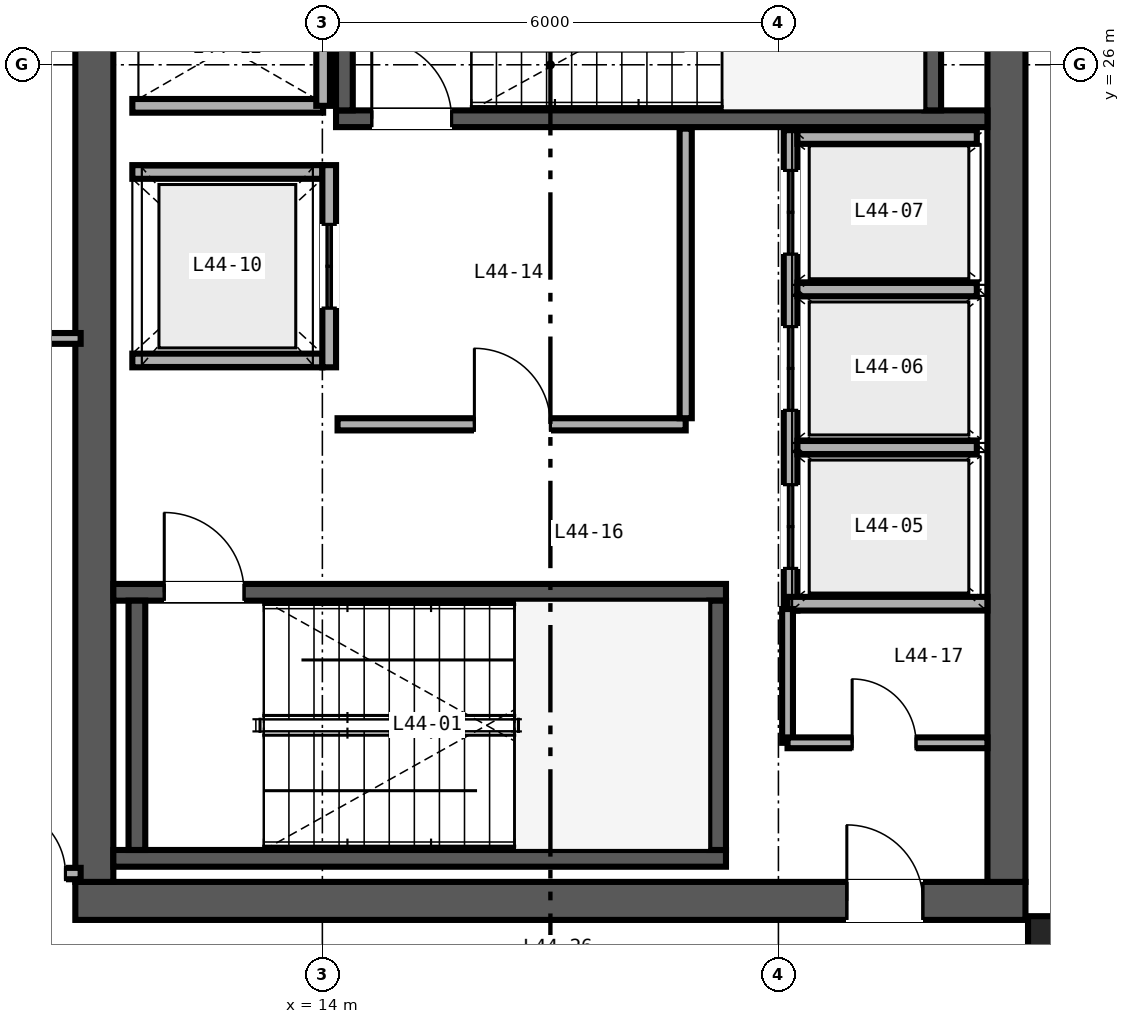
"""IFC4 building model, lengths in metres.
Left out: names, types, materials, properties, quantities, classifications, styles, units other than length and angle.
Written with IfcOpenShell. Run it as: python <this file> out.ifc"""

import sys

from ifc_helpers import new_model, si_unit, direction, frame, frame_2d, origin, origin_2d, place, context, subcontext, project, spatial, rectangle, i_section, extrude, source, transform, mapped, element, fill, save


model = new_model("IFC4")
c1 = context("Model", 3, precision=1e-05, world=origin(), true_north=direction((0.0, 1.0)))
c2 = subcontext(c1, "Body", "Model", "MODEL_VIEW")
j1 = project(units=[si_unit("LENGTHUNIT", "METRE"), si_unit("PLANEANGLEUNIT", "RADIAN")], contexts=[c1])
p1 = place(None, origin())
s1 = spatial("IfcSite", under=j1, at=p1, CompositionType="ELEMENT")
p2 = place(p1, origin())
s2 = spatial("IfcBuilding", under=s1, at=p2, CompositionType="ELEMENT")
p3 = place(p2, frame((0.0, 0.0, 177.6)))
s3 = spatial("IfcBuildingStorey", under=s2, at=p3, CompositionType="ELEMENT", Elevation=177.6)
p4 = place(p3, frame((10.75, 15.0, 0.0), z_axis=(0.0, 0.0, 1.0), x_axis=(1.0, 0.0, 0.0)))
e1 = element("IfcWall", 1, at=p4, inside=s3, PredefinedType="SHEAR", context=c2, shape_type="SweptSolid", body=[
    extrude(rectangle(XDim=12.5, YDim=0.5, at=frame_2d((6.25, 0.0))), origin(), (0.0, 0.0, 1.0), 3.37),
])
p5 = place(p4, frame((10.15, 0.0, 0.0)))
e2 = element("IfcOpeningElement", 2, at=p5, cuts=e1, PredefinedType="OPENING", context=c2, shape_type="SweptSolid", body=[
    extrude(rectangle(XDim=1.0, YDim=2.15, at=frame_2d((0.5, 1.075))), frame((0.0, 0.26, 0.0), z_axis=(0.0, -1.0, 0.0), x_axis=(1.0, 0.0, 0.0)), (0.0, 0.0, 1.0), 0.52),
])
for number, where, z_axis, x_axis in (
    (3, (11.0, 15.25, 0.0), (0.0, 0.0, 1.0), (0.0, 1.0, 0.0)),
    (4, (23.0, 15.25, 0.0), (0.0, 0.0, 1.0), (0.0, 1.0, 0.0)),
):
    element("IfcWall", number, at=place(p3, frame(where, z_axis=z_axis, x_axis=x_axis)), inside=s3, PredefinedType="SHEAR", context=c2, shape_type="SweptSolid", body=[
        extrude(rectangle(XDim=21.5, YDim=0.5, at=frame_2d((10.75, 0.0))), origin(), (0.0, 0.0, 1.0), 3.37),
    ])
p6 = place(p3, frame((11.25, 15.56, 0.0), z_axis=(0.0, 0.0, 1.0), x_axis=(1.0, 0.0, 0.0)))
e5 = element("IfcWall", 5, at=p6, inside=s3, PredefinedType="SHEAR", context=c2, shape_type="SweptSolid", body=[
    extrude(rectangle(XDim=8.06, YDim=0.22, at=frame_2d((4.03, 0.0))), origin(), (0.0, 0.0, 1.0), 3.4),
])
p7 = place(p3, frame((11.25, 19.06, 0.0), z_axis=(0.0, 0.0, 1.0), x_axis=(1.0, 0.0, 0.0)))
e6 = element("IfcWall", 6, at=p7, inside=s3, PredefinedType="SHEAR", context=c2, shape_type="SweptSolid", body=[
    extrude(rectangle(XDim=8.06, YDim=0.22, at=frame_2d((4.03, 0.0))), origin(), (0.0, 0.0, 1.0), 3.4),
])
p8 = place(p7, frame((0.67, 0.0, 0.0)))
e7 = element("IfcOpeningElement", 7, at=p8, cuts=e6, PredefinedType="OPENING", context=c2, shape_type="SweptSolid", body=[
    extrude(rectangle(XDim=1.05, YDim=2.15, at=frame_2d((0.525, 1.075))), frame((0.0, 0.12, 0.0), z_axis=(0.0, -1.0, 0.0), x_axis=(1.0, 0.0, 0.0)), (0.0, 0.0, 1.0), 0.24),
])
for number, where, z_axis, x_axis in (
    (8, (11.56, 15.67, 0.0), (0.0, 0.0, 1.0), (0.0, 1.0, 0.0)),
    (9, (19.2, 15.67, 0.0), (0.0, 0.0, 1.0), (0.0, 1.0, 0.0)),
):
    element("IfcWall", number, at=place(p3, frame(where, z_axis=z_axis, x_axis=x_axis)), inside=s3, PredefinedType="SHEAR", context=c2, shape_type="SweptSolid", body=[
        extrude(rectangle(XDim=3.28, YDim=0.22, at=frame_2d((1.64, 0.0))), origin(), (0.0, 0.0, 1.0), 3.4),
    ])
p9 = place(p3, frame((14.18, 25.29, 0.0), z_axis=(0.0, 0.0, 1.0), x_axis=(1.0, 0.0, 0.0)))
e10 = element("IfcWall", 10, at=p9, inside=s3, PredefinedType="SHEAR", context=c2, shape_type="SweptSolid", body=[
    extrude(rectangle(XDim=8.57, YDim=0.22, at=frame_2d((4.285, 0.0))), origin(), (0.0, 0.0, 1.0), 3.4),
])
p10 = place(p9, frame((0.47, 0.0, 0.0)))
e11 = element("IfcOpeningElement", 11, at=p10, cuts=e10, PredefinedType="OPENING", context=c2, shape_type="SweptSolid", body=[
    extrude(rectangle(XDim=1.05, YDim=2.15, at=frame_2d((0.525, 1.075))), frame((0.0, 0.12, 0.0), z_axis=(0.0, -1.0, 0.0), x_axis=(1.0, 0.0, 0.0)), (0.0, 0.0, 1.0), 0.24),
])
for number, where, z_axis, x_axis in (
    (12, (14.29, 25.4, 0.0), (0.0, 0.0, 1.0), (0.0, 1.0, 0.0)),
    (13, (22.03, 25.4, 0.0), (0.0, 0.0, 1.0), (0.0, 1.0, 0.0)),
):
    element("IfcWall", number, at=place(p3, frame(where, z_axis=z_axis, x_axis=x_axis)), inside=s3, PredefinedType="SHEAR", context=c2, shape_type="SweptSolid", body=[
        extrude(rectangle(XDim=3.28, YDim=0.22, at=frame_2d((1.64, 0.0))), origin(), (0.0, 0.0, 1.0), 3.4),
    ])
m1 = source(origin(), c2, "Body", "SweptSolid", [
    extrude(i_section(OverallWidth=0.432, OverallDepth=0.498, WebThickness=0.056, FlangeThickness=0.089, FilletRadius=0.025, at=origin_2d()), origin(), (0.0, 0.0, 1.0), 3.37),
])
p11 = place(p3, frame((23.5, 14.55, 0.0), z_axis=(0.0, 0.0, 1.0), x_axis=(1.0, 0.0, 0.0)))
e14 = element("IfcColumn", 14, at=p11, inside=s3, PredefinedType="COLUMN", context=c2, shape_type="MappedRepresentation", body=[
    mapped(m1, transform((0.0, 0.0, 0.0), scale=1.0)),
])
p12 = place(p3, frame((20.16, 18.82, 0.0), z_axis=(0.0, 0.0, 1.0), x_axis=(0.0, 1.0, 0.0)))
e15 = element("IfcWall", 15, at=p12, inside=s3, PredefinedType="SOLIDWALL", context=c2, shape_type="SweptSolid", body=[
    extrude(rectangle(XDim=6.32, YDim=0.18, at=frame_2d((3.16, 0.0))), origin(), (0.0, 0.0, 1.0), 2.47),
])
p13 = place(p12, frame((0.555, 0.0, 0.0)))
e16 = element("IfcOpeningElement", 16, at=p13, cuts=e15, PredefinedType="OPENING", context=c2, shape_type="SweptSolid", body=[
    extrude(rectangle(XDim=1.1, YDim=2.2, at=frame_2d((0.55, 1.1))), frame((0.0, 0.1, 0.0), z_axis=(0.0, -1.0, 0.0), x_axis=(1.0, 0.0, 0.0)), (0.0, 0.0, 1.0), 0.2),
])
p14 = place(p12, frame((2.635, 0.0, 0.0)))
e17 = element("IfcOpeningElement", 17, at=p14, cuts=e15, PredefinedType="OPENING", context=c2, shape_type="SweptSolid", body=[
    extrude(rectangle(XDim=1.1, YDim=2.2, at=frame_2d((0.55, 1.1))), frame((0.0, 0.1, 0.0), z_axis=(0.0, -1.0, 0.0), x_axis=(1.0, 0.0, 0.0)), (0.0, 0.0, 1.0), 0.2),
])
p15 = place(p12, frame((4.69, 0.0, 0.0)))
e18 = element("IfcOpeningElement", 18, at=p15, cuts=e15, PredefinedType="OPENING", context=c2, shape_type="SweptSolid", body=[
    extrude(rectangle(XDim=1.1, YDim=2.2, at=frame_2d((0.55, 1.1))), frame((0.0, 0.1, 0.0), z_axis=(0.0, -1.0, 0.0), x_axis=(1.0, 0.0, 0.0)), (0.0, 0.0, 1.0), 0.2),
])
p16 = place(p3, frame((20.12, 18.91, 0.0), z_axis=(0.0, 0.0, 1.0), x_axis=(1.0, 0.0, 0.0)))
e19 = element("IfcWall", 19, at=p16, inside=s3, PredefinedType="SOLIDWALL", context=c2, shape_type="SweptSolid", body=[
    extrude(rectangle(XDim=2.63, YDim=0.18, at=frame_2d((1.315, 0.0))), origin(), (0.0, 0.0, 1.0), 3.37),
])
p17 = place(p3, frame((20.25, 25.05, 0.0), z_axis=(0.0, 0.0, 1.0), x_axis=(1.0, 0.0, 0.0)))
e20 = element("IfcWall", 20, at=p17, inside=s3, PredefinedType="SOLIDWALL", context=c2, shape_type="SweptSolid", body=[
    extrude(rectangle(XDim=2.36, YDim=0.18, at=frame_2d((1.18, 0.0))), origin(), (0.0, 0.0, 1.0), 3.37),
])
p18 = place(p3, frame((20.25, 20.965, 0.0), z_axis=(0.0, 0.0, 1.0), x_axis=(1.0, 0.0, 0.0)))
e21 = element("IfcWall", 21, at=p18, inside=s3, PredefinedType="SOLIDWALL", context=c2, shape_type="SweptSolid", body=[
    extrude(rectangle(XDim=2.36, YDim=0.18, at=frame_2d((1.18, 0.0))), origin(), (0.0, 0.0, 1.0), 2.47),
])
p19 = place(p3, frame((20.25, 23.045, 0.0), z_axis=(0.0, 0.0, 1.0), x_axis=(1.0, 0.0, 0.0)))
e22 = element("IfcWall", 22, at=p19, inside=s3, PredefinedType="SOLIDWALL", context=c2, shape_type="SweptSolid", body=[
    extrude(rectangle(XDim=2.36, YDim=0.18, at=frame_2d((1.18, 0.0))), origin(), (0.0, 0.0, 1.0), 3.37),
])
for number, where, z_axis, x_axis in (
    (23, (11.5, 22.11, 0.0), (0.0, 0.0, 1.0), (1.0, 0.0, 0.0)),
    (24, (11.5, 24.59, 0.0), (0.0, 0.0, 1.0), (1.0, 0.0, 0.0)),
):
    element("IfcWall", number, at=place(p3, frame(where, z_axis=z_axis, x_axis=x_axis)), inside=s3, PredefinedType="SOLIDWALL", context=c2, shape_type="SweptSolid", body=[
        extrude(rectangle(XDim=2.5, YDim=0.18, at=frame_2d((1.25, 0.0))), origin(), (0.0, 0.0, 1.0), 3.37),
    ])
p20 = place(p3, frame((14.09, 22.02, 0.0), z_axis=(0.0, 0.0, 1.0), x_axis=(0.0, 1.0, 0.0)))
e25 = element("IfcWall", 25, at=p20, inside=s3, PredefinedType="SOLIDWALL", context=c2, shape_type="SweptSolid", body=[
    extrude(rectangle(XDim=2.66, YDim=0.18, at=frame_2d((1.33, 0.0))), origin(), (0.0, 0.0, 1.0), 3.37),
])
p21 = place(p20, frame((0.78, 0.0, 0.0)))
e26 = element("IfcOpeningElement", 26, at=p21, cuts=e25, PredefinedType="OPENING", context=c2, shape_type="SweptSolid", body=[
    extrude(rectangle(XDim=1.1, YDim=2.2, at=frame_2d((0.55, 1.1))), frame((0.0, 0.1, 0.0), z_axis=(0.0, -1.0, 0.0), x_axis=(1.0, 0.0, 0.0)), (0.0, 0.0, 1.0), 0.2),
])
p22 = place(p3, frame((11.5, 25.46, 0.0), z_axis=(0.0, 0.0, 1.0), x_axis=(1.0, 0.0, 0.0)))
e27 = element("IfcWall", 27, at=p22, inside=s3, PredefinedType="SOLIDWALL", context=c2, shape_type="SweptSolid", body=[
    extrude(rectangle(XDim=2.51, YDim=0.18, at=frame_2d((1.255, 0.0))), origin(), (0.0, 0.0, 1.0), 3.37),
])
p23 = place(p3, frame((14.01, 25.46, 0.0), z_axis=(0.0, 0.0, 1.0), x_axis=(0.0, 1.0, 0.0)))
e28 = element("IfcWall", 28, at=p23, inside=s3, PredefinedType="SOLIDWALL", context=c2, shape_type="SweptSolid", body=[
    extrude(rectangle(XDim=3.08, YDim=0.18, at=frame_2d((1.54, 0.0))), origin(), (0.0, 0.0, 1.0), 3.37),
])
p24 = place(p3, frame((14.2, 21.27, 0.0), z_axis=(0.0, 0.0, 1.0), x_axis=(1.0, 0.0, 0.0)))
e29 = element("IfcWall", 29, at=p24, inside=s3, PredefinedType="PARTITIONING", context=c2, shape_type="SweptSolid", body=[
    extrude(rectangle(XDim=4.58, YDim=0.16, at=frame_2d((2.29, 0.0))), origin(), (0.0, 0.0, 1.0), 3.37),
])
p25 = place(p24, frame((1.8, 0.0, 0.0)))
e30 = element("IfcOpeningElement", 30, at=p25, cuts=e29, PredefinedType="OPENING", context=c2, shape_type="SweptSolid", body=[
    extrude(rectangle(XDim=1.0, YDim=2.15, at=frame_2d((0.5, 1.075))), frame((0.0, 0.09, 0.0), z_axis=(0.0, -1.0, 0.0), x_axis=(1.0, 0.0, 0.0)), (0.0, 0.0, 1.0), 0.18),
])
p26 = place(p3, frame((18.78, 21.35, 0.0), z_axis=(0.0, 0.0, 1.0), x_axis=(0.0, 1.0, 0.0)))
e31 = element("IfcWall", 31, at=p26, inside=s3, PredefinedType="PARTITIONING", context=c2, shape_type="SweptSolid", body=[
    extrude(rectangle(XDim=3.81, YDim=0.16, at=frame_2d((1.905, 0.0))), origin(), (0.0, 0.0, 1.0), 3.37),
])
p27 = place(p3, frame((20.12, 17.08, 0.0), z_axis=(0.0, 0.0, 1.0), x_axis=(0.0, 1.0, 0.0)))
e32 = element("IfcWall", 32, at=p27, inside=s3, PredefinedType="PARTITIONING", context=c2, shape_type="SweptSolid", body=[
    extrude(rectangle(XDim=1.76, YDim=0.142, at=frame_2d((0.88, 0.0))), origin(), (0.0, 0.0, 1.0), 3.37),
])
p28 = place(p3, frame((20.12, 17.08, 0.0), z_axis=(0.0, 0.0, 1.0), x_axis=(1.0, 0.0, 0.0)))
e33 = element("IfcWall", 33, at=p28, inside=s3, PredefinedType="PARTITIONING", context=c2, shape_type="SweptSolid", body=[
    extrude(rectangle(XDim=2.63, YDim=0.142, at=frame_2d((1.315, 0.0))), origin(), (0.0, 0.0, 1.0), 3.37),
])
p29 = place(p28, frame((0.85, 0.0, 0.0)))
e34 = element("IfcOpeningElement", 34, at=p29, cuts=e33, PredefinedType="OPENING", context=c2, shape_type="SweptSolid", body=[
    extrude(rectangle(XDim=0.84, YDim=2.1, at=frame_2d((0.42, 1.05))), frame((0.0, 0.081, 0.0), z_axis=(0.0, -1.0, 0.0), x_axis=(1.0, 0.0, 0.0)), (0.0, 0.0, 1.0), 0.162),
])
p30 = place(p3, frame((8.16, 15.36, 0.0), z_axis=(0.0, 0.0, 1.0), x_axis=(1.0, 0.0, 0.0)))
e35 = element("IfcWall", 35, at=p30, inside=s3, PredefinedType="PARTITIONING", context=c2, shape_type="SweptSolid", body=[
    extrude(rectangle(XDim=2.66, YDim=0.15, at=frame_2d((1.33, 0.0))), origin(), (0.0, 0.0, 1.0), 2.591),
])
p31 = place(p30, frame((1.58, 0.0, 0.0)))
e36 = element("IfcOpeningElement", 36, at=p31, cuts=e35, PredefinedType="OPENING", context=c2, shape_type="SweptSolid", body=[
    extrude(rectangle(XDim=0.88, YDim=2.15, at=frame_2d((0.44, 1.075))), frame((0.0, 0.085, 0.0), z_axis=(0.0, -1.0, 0.0), x_axis=(1.0, 0.0, 0.0)), (0.0, 0.0, 1.0), 0.17),
])
p32 = place(p3, frame((8.16, 22.4, 0.0), z_axis=(0.0, 0.0, 1.0), x_axis=(1.0, 0.0, 0.0)))
e37 = element("IfcWall", 37, at=p32, inside=s3, PredefinedType="PARTITIONING", context=c2, shape_type="SweptSolid", body=[
    extrude(rectangle(XDim=2.66, YDim=0.142, at=frame_2d((1.33, 0.0))), origin(), (0.0, 0.0, 1.0), 2.591),
])
m2 = source(origin(), c2, "Body", "SweptSolid", [
    extrude(rectangle(XDim=1.05, YDim=2.15, at=frame_2d((0.525, 1.075))), frame((0.0, 0.025, 0.0), z_axis=(0.0, -1.0, 0.0), x_axis=(1.0, 0.0, 0.0)), (0.0, 0.0, 1.0), 0.05),
])
p33 = place(p8, origin())
e38 = element("IfcDoor", 38, at=p33, inside=s3, OperationType="SINGLE_SWING_LEFT", PredefinedType="DOOR", context=c2, shape_type="MappedRepresentation", body=[
    mapped(m2, transform((0.0, 0.0, 0.0), scale=1.0)),
])
fill(e7, e38)
p34 = place(p10, origin())
e39 = element("IfcDoor", 39, at=p34, inside=s3, OperationType="SINGLE_SWING_LEFT", PredefinedType="DOOR", context=c2, shape_type="MappedRepresentation", body=[
    mapped(m2, transform((0.0, 0.0, 0.0), scale=1.0)),
])
fill(e11, e39)
m3 = source(origin(), c2, "Body", "SweptSolid", [
    extrude(rectangle(XDim=1.1, YDim=2.2, at=frame_2d((0.55, 1.1))), frame((0.0, 0.025, 0.0), z_axis=(0.0, -1.0, 0.0), x_axis=(1.0, 0.0, 0.0)), (0.0, 0.0, 1.0), 0.05),
])
p35 = place(p13, origin())
e40 = element("IfcDoor", 40, at=p35, inside=s3, OperationType="DOUBLE_DOOR_SLIDING", PredefinedType="DOOR", context=c2, shape_type="MappedRepresentation", body=[
    mapped(m3, transform((0.0, 0.0, 0.0), scale=1.0)),
])
fill(e16, e40)
p36 = place(p14, origin())
e41 = element("IfcDoor", 41, at=p36, inside=s3, OperationType="DOUBLE_DOOR_SLIDING", PredefinedType="DOOR", context=c2, shape_type="MappedRepresentation", body=[
    mapped(m3, transform((0.0, 0.0, 0.0), scale=1.0)),
])
fill(e17, e41)
p37 = place(p15, origin())
e42 = element("IfcDoor", 42, at=p37, inside=s3, OperationType="DOUBLE_DOOR_SLIDING", PredefinedType="DOOR", context=c2, shape_type="MappedRepresentation", body=[
    mapped(m3, transform((0.0, 0.0, 0.0), scale=1.0)),
])
fill(e18, e42)
p38 = place(p21, origin())
e43 = element("IfcDoor", 43, at=p38, inside=s3, OperationType="DOUBLE_DOOR_SLIDING", PredefinedType="DOOR", context=c2, shape_type="MappedRepresentation", body=[
    mapped(m3, transform((0.0, 0.0, 0.0), scale=1.0)),
])
fill(e26, e43)
m4 = source(origin(), c2, "Body", "SweptSolid", [
    extrude(rectangle(XDim=1.0, YDim=2.15, at=frame_2d((0.5, 1.075))), frame((0.0, 0.025, 0.0), z_axis=(0.0, -1.0, 0.0), x_axis=(1.0, 0.0, 0.0)), (0.0, 0.0, 1.0), 0.05),
])
p39 = place(p25, origin())
e44 = element("IfcDoor", 44, at=p39, inside=s3, OperationType="SINGLE_SWING_LEFT", PredefinedType="DOOR", context=c2, shape_type="MappedRepresentation", body=[
    mapped(m4, transform((0.0, 0.0, 0.0), scale=1.0)),
])
fill(e30, e44)
m5 = source(origin(), c2, "Body", "SweptSolid", [
    extrude(rectangle(XDim=0.84, YDim=2.1, at=frame_2d((0.42, 1.05))), frame((0.0, 0.025, 0.0), z_axis=(0.0, -1.0, 0.0), x_axis=(1.0, 0.0, 0.0)), (0.0, 0.0, 1.0), 0.05),
])
p40 = place(p29, origin())
e45 = element("IfcDoor", 45, at=p40, inside=s3, OperationType="SINGLE_SWING_LEFT", PredefinedType="DOOR", context=c2, shape_type="MappedRepresentation", body=[
    mapped(m5, transform((0.0, 0.0, 0.0), scale=1.0)),
])
fill(e34, e45)
p41 = place(p5, origin())
e46 = element("IfcDoor", 46, at=p41, inside=s3, OperationType="SINGLE_SWING_LEFT", PredefinedType="DOOR", context=c2, shape_type="MappedRepresentation", body=[
    mapped(m4, transform((0.0, 0.0, 0.0), scale=1.0)),
])
fill(e2, e46)
m6 = source(origin(), c2, "Body", "SweptSolid", [
    extrude(rectangle(XDim=0.88, YDim=2.15, at=frame_2d((0.44, 1.075))), frame((0.0, 0.025, 0.0), z_axis=(0.0, -1.0, 0.0), x_axis=(1.0, 0.0, 0.0)), (0.0, 0.0, 1.0), 0.05),
])
p42 = place(p31, origin())
e47 = element("IfcDoor", 47, at=p42, inside=s3, OperationType="SINGLE_SWING_LEFT", PredefinedType="DOOR", context=c2, shape_type="MappedRepresentation", body=[
    mapped(m6, transform((0.0, 0.0, 0.0), scale=1.0)),
])
fill(e36, e47)
save(model, sys.argv[1])
